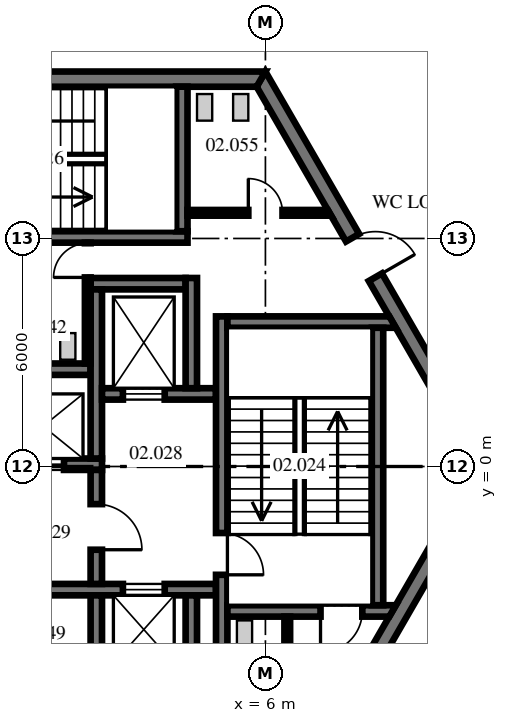
"""IFC4 building model, lengths in metres.
Left out: names, types, materials, properties, quantities, classifications, styles, units other than length and angle.
Written with IfcOpenShell. Run it as: python <this file> out.ifc"""

import sys

from ifc_helpers import new_model, si_unit, direction, frame, frame_2d, origin, place, context, subcontext, project, spatial, polyline, rectangle, outline, extrude, source, transform, mapped, element, fill, save


model = new_model("IFC4")
c1 = context("Model", 3, precision=1e-05, world=origin(), true_north=direction((0.0, 1.0)))
c2 = subcontext(c1, "Body", "Model", "MODEL_VIEW")
j1 = project(units=[si_unit("LENGTHUNIT", "METRE"), si_unit("PLANEANGLEUNIT", "RADIAN")], contexts=[c1])
p1 = place(None, origin())
s1 = spatial("IfcSite", under=j1, at=p1, CompositionType="ELEMENT")
p2 = place(p1, origin())
s2 = spatial("IfcBuilding", under=s1, at=p2, CompositionType="ELEMENT")
p3 = place(p2, frame((0.0, 0.0, 11.5)))
s3 = spatial("IfcBuildingStorey", under=s2, at=p3, CompositionType="ELEMENT", Elevation=11.5)
m1 = source(origin(), c2, "Body", "SweptSolid", [
    extrude(outline(polyline([(-0.115, -0.2), (11.885, -0.2), (11.654, 0.2), (0.115, 0.2), (-0.115, -0.2)])), origin(), (0.0, 0.0, 1.0), 4.3),
])
p4 = place(p3, frame((11.769, 0.0, 0.0), z_axis=(0.0, 0.0, 1.0), x_axis=(-0.499996592174, 0.866027371285, 0.0)))
e1 = element("IfcWall", 1, at=p4, inside=s3, PredefinedType="SHEAR", context=c2, shape_type="MappedRepresentation", body=[
    mapped(m1, transform((0.0, 0.0, 0.0), scale=1.0)),
])
p5 = place(p4, frame((5.75, 0.0, 0.0)))
e2 = element("IfcOpeningElement", 2, at=p5, cuts=e1, PredefinedType="OPENING", context=c2, shape_type="SweptSolid", body=[
    extrude(rectangle(XDim=1.2, YDim=2.1, at=frame_2d((0.6, 1.05))), frame((0.0, 0.21, 0.0), z_axis=(0.0, -1.0, 0.0), x_axis=(1.0, 0.0, 0.0)), (0.0, 0.0, 1.0), 0.42),
])
p6 = place(p3, frame((5.885, 10.192, 0.0), z_axis=(0.0, 0.0, 1.0), x_axis=(-1.0, 0.0, 0.0)))
e3 = element("IfcWall", 3, at=p6, inside=s3, PredefinedType="SHEAR", context=c2, shape_type="MappedRepresentation", body=[
    mapped(m1, transform((0.0, 0.0, 0.0), scale=1.0)),
])
p7 = place(p6, frame((7.985, 0.0, 0.0)))
e4 = element("IfcOpeningElement", 4, at=p7, cuts=e3, PredefinedType="OPENING", context=c2, shape_type="SweptSolid", body=[
    extrude(rectangle(XDim=1.2, YDim=2.1, at=frame_2d((0.6, 1.05))), frame((0.0, 0.21, 0.0), z_axis=(0.0, -1.0, 0.0), x_axis=(1.0, 0.0, 0.0)), (0.0, 0.0, 1.0), 0.42),
])
p8 = place(p3, frame((5.885, -10.192, 0.0), z_axis=(0.0, 0.0, 1.0), x_axis=(0.499996592174, 0.866027371285, 0.0)))
e5 = element("IfcWall", 5, at=p8, inside=s3, PredefinedType="SHEAR", context=c2, shape_type="MappedRepresentation", body=[
    mapped(m1, transform((0.0, 0.0, 0.0), scale=1.0)),
])
p9 = place(p8, frame((3.665, 0.0, 0.0)))
e6 = element("IfcOpeningElement", 6, at=p9, cuts=e5, PredefinedType="OPENING", context=c2, shape_type="SweptSolid", body=[
    extrude(rectangle(XDim=1.2, YDim=2.1, at=frame_2d((0.6, 1.05))), frame((0.0, 0.21, 0.0), z_axis=(0.0, -1.0, 0.0), x_axis=(1.0, 0.0, 0.0)), (0.0, 0.0, 1.0), 0.42),
])
m2 = source(origin(), c2, "Body", "SweptSolid", [
    extrude(rectangle(XDim=11.5, YDim=0.3, at=frame_2d((5.75, 0.0))), origin(), (0.0, 0.0, 1.0), 4.3),
])
p10 = place(p3, frame((-9.8, 0.06, 0.0), z_axis=(0.0, 0.0, 1.0), x_axis=(1.0, 0.0, 0.0)))
e7 = element("IfcWall", 7, at=p10, inside=s3, PredefinedType="SHEAR", context=c2, shape_type="MappedRepresentation", body=[
    mapped(m2, transform((0.0, 0.0, 0.0), scale=1.0)),
])
p11 = place(p10, frame((1.0, 0.0, 0.0)))
e8 = element("IfcOpeningElement", 8, at=p11, cuts=e7, PredefinedType="OPENING", context=c2, shape_type="SweptSolid", body=[
    extrude(rectangle(XDim=1.1, YDim=2.1, at=frame_2d((0.55, 1.05))), frame((0.0, 0.16, 0.0), z_axis=(0.0, -1.0, 0.0), x_axis=(1.0, 0.0, 0.0)), (0.0, 0.0, 1.0), 0.32),
])
p12 = place(p10, frame((3.8, 0.0, 0.0)))
e9 = element("IfcOpeningElement", 9, at=p12, cuts=e7, PredefinedType="OPENING", context=c2, shape_type="SweptSolid", body=[
    extrude(rectangle(XDim=1.1, YDim=2.1, at=frame_2d((0.55, 1.05))), frame((0.0, 0.16, 0.0), z_axis=(0.0, -1.0, 0.0), x_axis=(1.0, 0.0, 0.0)), (0.0, 0.0, 1.0), 0.32),
])
p13 = place(p10, frame((6.6, 0.0, 0.0)))
e10 = element("IfcOpeningElement", 10, at=p13, cuts=e7, PredefinedType="OPENING", context=c2, shape_type="SweptSolid", body=[
    extrude(rectangle(XDim=1.1, YDim=2.1, at=frame_2d((0.55, 1.05))), frame((0.0, 0.16, 0.0), z_axis=(0.0, -1.0, 0.0), x_axis=(1.0, 0.0, 0.0)), (0.0, 0.0, 1.0), 0.32),
])
p14 = place(p10, frame((9.4, 0.0, 0.0)))
e11 = element("IfcOpeningElement", 11, at=p14, cuts=e7, PredefinedType="OPENING", context=c2, shape_type="SweptSolid", body=[
    extrude(rectangle(XDim=1.1, YDim=2.1, at=frame_2d((0.55, 1.05))), frame((0.0, 0.16, 0.0), z_axis=(0.0, -1.0, 0.0), x_axis=(1.0, 0.0, 0.0)), (0.0, 0.0, 1.0), 0.32),
])
m3 = source(origin(), c2, "Body", "SweptSolid", [
    extrude(outline(polyline([(11.2, -0.15), (-0.349, -0.15), (-0.176, 0.15), (11.2, 0.15), (11.2, -0.15)])), origin(), (0.0, 0.0, 1.0), 4.3),
])
p15 = place(p3, frame((-9.8, 2.56, 0.0), z_axis=(0.0, 0.0, 1.0), x_axis=(1.0, 0.0, 0.0)))
e12 = element("IfcWall", 12, at=p15, inside=s3, PredefinedType="SHEAR", context=c2, shape_type="MappedRepresentation", body=[
    mapped(m3, transform((0.0, 0.0, 0.0), scale=1.0)),
])
m4 = source(origin(), c2, "Body", "SweptSolid", [
    extrude(rectangle(XDim=2.5, YDim=0.3, at=frame_2d((1.25, 0.0))), origin(), (0.0, 0.0, 1.0), 4.3),
])
p16 = place(p3, frame((1.4, 4.81, 0.0), z_axis=(0.0, 0.0, 1.0), x_axis=(1.0, 0.0, 0.0)))
e13 = element("IfcWall", 13, at=p16, inside=s3, PredefinedType="SHEAR", context=c2, shape_type="MappedRepresentation", body=[
    mapped(m4, transform((0.0, 0.0, 0.0), scale=1.0)),
])
m5 = source(origin(), c2, "Body", "SweptSolid", [
    extrude(rectangle(XDim=4.45, YDim=0.3, at=frame_2d((2.225, 0.0))), origin(), (0.0, 0.0, 1.0), 4.3),
])
p17 = place(p3, frame((1.55, 0.21, 0.0), z_axis=(0.0, 0.0, 1.0), x_axis=(0.0, 1.0, 0.0)))
e14 = element("IfcWall", 14, at=p17, inside=s3, PredefinedType="SHEAR", context=c2, shape_type="MappedRepresentation", body=[
    mapped(m5, transform((0.0, 0.0, 0.0), scale=1.0)),
])
m6 = source(origin(), c2, "Body", "SweptSolid", [
    extrude(rectangle(XDim=3.0, YDim=0.3, at=frame_2d((1.5, 0.0))), origin(), (0.0, 0.0, 1.0), 4.3),
])
p18 = place(p3, frame((1.7, 1.91, 0.0), z_axis=(0.0, 0.0, 1.0), x_axis=(1.0, 0.0, 0.0)))
e15 = element("IfcWall", 15, at=p18, inside=s3, PredefinedType="SHEAR", context=c2, shape_type="MappedRepresentation", body=[
    mapped(m6, transform((0.0, 0.0, 0.0), scale=1.0)),
])
p19 = place(p18, frame((0.55, 0.0, 0.0)))
e16 = element("IfcOpeningElement", 16, at=p19, cuts=e15, PredefinedType="OPENING", context=c2, shape_type="SweptSolid", body=[
    extrude(rectangle(XDim=1.1, YDim=2.1, at=frame_2d((0.55, 1.05))), frame((0.0, 0.16, 0.0), z_axis=(0.0, -1.0, 0.0), x_axis=(1.0, 0.0, 0.0)), (0.0, 0.0, 1.0), 0.32),
])
m7 = source(origin(), c2, "Body", "SweptSolid", [
    extrude(rectangle(XDim=2.9, YDim=0.3, at=frame_2d((1.45, 0.0))), origin(), (0.0, 0.0, 1.0), 4.3),
])
p20 = place(p3, frame((4.05, 2.06, 0.0), z_axis=(0.0, 0.0, 1.0), x_axis=(0.0, 1.0, 0.0)))
e17 = element("IfcWall", 17, at=p20, inside=s3, PredefinedType="SHEAR", context=c2, shape_type="MappedRepresentation", body=[
    mapped(m7, transform((0.0, 0.0, 0.0), scale=1.0)),
])
m8 = source(origin(), c2, "Body", "SweptSolid", [
    extrude(rectangle(XDim=12.8, YDim=0.3, at=frame_2d((6.4, 0.0))), origin(), (0.0, 0.0, 1.0), 4.3),
])
p21 = place(p3, frame((-8.1, -3.24, 0.0), z_axis=(0.0, 0.0, 1.0), x_axis=(1.0, 0.0, 0.0)))
e18 = element("IfcWall", 18, at=p21, inside=s3, PredefinedType="SHEAR", context=c2, shape_type="MappedRepresentation", body=[
    mapped(m8, transform((0.0, 0.0, 0.0), scale=1.0)),
])
p22 = place(p21, frame((1.613, 0.0, 0.0)))
e19 = element("IfcOpeningElement", 19, at=p22, cuts=e18, PredefinedType="OPENING", context=c2, shape_type="SweptSolid", body=[
    extrude(rectangle(XDim=0.9, YDim=2.1, at=frame_2d((0.45, 1.05))), frame((0.0, 0.16, 0.0), z_axis=(0.0, -1.0, 0.0), x_axis=(1.0, 0.0, 0.0)), (0.0, 0.0, 1.0), 0.32),
])
p23 = place(p21, frame((4.45, 0.0, 0.0)))
e20 = element("IfcOpeningElement", 20, at=p23, cuts=e18, PredefinedType="OPENING", context=c2, shape_type="SweptSolid", body=[
    extrude(rectangle(XDim=0.9, YDim=2.1, at=frame_2d((0.45, 1.05))), frame((0.0, 0.16, 0.0), z_axis=(0.0, -1.0, 0.0), x_axis=(1.0, 0.0, 0.0)), (0.0, 0.0, 1.0), 0.32),
])
p24 = place(p21, frame((7.288, 0.0, 0.0)))
e21 = element("IfcOpeningElement", 21, at=p24, cuts=e18, PredefinedType="OPENING", context=c2, shape_type="SweptSolid", body=[
    extrude(rectangle(XDim=0.9, YDim=2.1, at=frame_2d((0.45, 1.05))), frame((0.0, 0.16, 0.0), z_axis=(0.0, -1.0, 0.0), x_axis=(1.0, 0.0, 0.0)), (0.0, 0.0, 1.0), 0.32),
])
p25 = place(p21, frame((10.35, 0.0, 0.0)))
e22 = element("IfcOpeningElement", 22, at=p25, cuts=e18, PredefinedType="OPENING", context=c2, shape_type="SweptSolid", body=[
    extrude(rectangle(XDim=1.1, YDim=2.1, at=frame_2d((0.55, 1.05))), frame((0.0, 0.16, 0.0), z_axis=(0.0, -1.0, 0.0), x_axis=(1.0, 0.0, 0.0)), (0.0, 0.0, 1.0), 0.32),
])
m9 = source(origin(), c2, "Body", "SweptSolid", [
    extrude(rectangle(XDim=2.2, YDim=0.3, at=frame_2d((1.1, 0.0))), origin(), (0.0, 0.0, 1.0), 4.3),
])
p26 = place(p3, frame((1.55, -5.59, 0.0), z_axis=(0.0, 0.0, 1.0), x_axis=(0.0, 1.0, 0.0)))
e23 = element("IfcWall", 23, at=p26, inside=s3, PredefinedType="SHEAR", context=c2, shape_type="MappedRepresentation", body=[
    mapped(m9, transform((0.0, 0.0, 0.0), scale=1.0)),
])
p27 = place(p3, frame((4.05, -5.89, 0.0), z_axis=(0.0, 0.0, 1.0), x_axis=(0.0, 1.0, 0.0)))
e24 = element("IfcWall", 24, at=p27, inside=s3, PredefinedType="SHEAR", context=c2, shape_type="MappedRepresentation", body=[
    mapped(m4, transform((0.0, 0.0, 0.0), scale=1.0)),
])
p28 = place(p3, frame((1.55, -3.09, 0.0), z_axis=(0.0, 0.0, 1.0), x_axis=(0.0, 1.0, 0.0)))
e25 = element("IfcWall", 25, at=p28, inside=s3, PredefinedType="SHEAR", context=c2, shape_type="MappedRepresentation", body=[
    mapped(m6, transform((0.0, 0.0, 0.0), scale=1.0)),
])
p29 = place(p28, frame((0.9, 0.0, 0.0)))
e26 = element("IfcOpeningElement", 26, at=p29, cuts=e25, PredefinedType="OPENING", context=c2, shape_type="SweptSolid", body=[
    extrude(rectangle(XDim=1.2, YDim=2.1, at=frame_2d((0.6, 1.05))), frame((0.0, 0.16, 0.0), z_axis=(0.0, -1.0, 0.0), x_axis=(1.0, 0.0, 0.0)), (0.0, 0.0, 1.0), 0.32),
])
m10 = source(origin(), c2, "Body", "SweptSolid", [
    extrude(outline(polyline([(-0.15, -0.15), (9.99, -0.15), (9.99, 0.15), (0.15, 0.15), (-0.15, -0.15)])), origin(), (0.0, 0.0, 1.0), 4.3),
])
p30 = place(p3, frame((4.85, -6.04, 0.0), z_axis=(0.0, 0.0, 1.0), x_axis=(0.0, 1.0, 0.0)))
e27 = element("IfcWall", 27, at=p30, inside=s3, PredefinedType="SHEAR", context=c2, shape_type="MappedRepresentation", body=[
    mapped(m10, transform((0.0, 0.0, 0.0), scale=1.0)),
])
p31 = place(p30, frame((3.19, 0.0, 0.0)))
e28 = element("IfcOpeningElement", 28, at=p31, cuts=e27, PredefinedType="OPENING", context=c2, shape_type="SweptSolid", body=[
    extrude(rectangle(XDim=1.1, YDim=2.1, at=frame_2d((0.55, 1.05))), frame((0.0, 0.16, 0.0), z_axis=(0.0, -1.0, 0.0), x_axis=(1.0, 0.0, 0.0)), (0.0, 0.0, 1.0), 0.32),
])
m11 = source(origin(), c2, "Body", "SweptSolid", [
    extrude(outline(polyline([(0.0, -0.15), (0.0, 0.15), (4.26, 0.15), (4.433, -0.15), (0.0, -0.15)])), origin(), (0.0, 0.0, 1.0), 4.3),
])
p32 = place(p3, frame((5.0, 3.8, 0.0), z_axis=(0.0, 0.0, 1.0), x_axis=(1.0, 0.0, 0.0)))
e29 = element("IfcWall", 29, at=p32, inside=s3, PredefinedType="SHEAR", context=c2, shape_type="MappedRepresentation", body=[
    mapped(m11, transform((0.0, 0.0, 0.0), scale=1.0)),
])
m12 = source(origin(), c2, "Body", "SweptSolid", [
    extrude(outline(polyline([(0.0, -0.15), (0.0, 0.15), (4.433, 0.15), (4.26, -0.15), (0.0, -0.15)])), origin(), (0.0, 0.0, 1.0), 4.3),
])
p33 = place(p3, frame((5.0, -3.8, 0.0), z_axis=(0.0, 0.0, 1.0), x_axis=(1.0, 0.0, 0.0)))
e30 = element("IfcWall", 30, at=p33, inside=s3, PredefinedType="SHEAR", context=c2, shape_type="MappedRepresentation", body=[
    mapped(m12, transform((0.0, 0.0, 0.0), scale=1.0)),
])
p34 = place(p33, frame((2.45, 0.0, 0.0)))
e31 = element("IfcOpeningElement", 31, at=p34, cuts=e30, PredefinedType="OPENING", context=c2, shape_type="SweptSolid", body=[
    extrude(rectangle(XDim=1.1, YDim=2.1, at=frame_2d((0.55, 1.05))), frame((0.0, 0.16, 0.0), z_axis=(0.0, -1.0, 0.0), x_axis=(1.0, 0.0, 0.0)), (0.0, 0.0, 1.0), 0.32),
])
m13 = source(origin(), c2, "Body", "SweptSolid", [
    extrude(rectangle(XDim=7.3, YDim=0.3, at=frame_2d((3.65, 0.0))), origin(), (0.0, 0.0, 1.0), 4.3),
])
p35 = place(p3, frame((8.95, -3.65, 0.0), z_axis=(0.0, 0.0, 1.0), x_axis=(0.0, 1.0, 0.0)))
e32 = element("IfcWall", 32, at=p35, inside=s3, PredefinedType="SHEAR", context=c2, shape_type="MappedRepresentation", body=[
    mapped(m13, transform((0.0, 0.0, 0.0), scale=1.0)),
])
m14 = source(origin(), c2, "Body", "SweptSolid", [
    extrude(rectangle(XDim=7.9, YDim=0.3, at=frame_2d((3.95, 0.0))), origin(), (0.0, 0.0, 1.0), 4.3),
])
p36 = place(p3, frame((-3.95, 6.04, 0.0), z_axis=(0.0, 0.0, 1.0), x_axis=(1.0, 0.0, 0.0)))
e33 = element("IfcWall", 33, at=p36, inside=s3, PredefinedType="SHEAR", context=c2, shape_type="MappedRepresentation", body=[
    mapped(m14, transform((0.0, 0.0, 0.0), scale=1.0)),
])
m15 = source(origin(), c2, "Body", "SweptSolid", [
    extrude(outline(polyline([(0.0, -0.15), (0.0, 0.15), (3.804, 0.15), (3.804, -0.15), (0.0, -0.15)])), origin(), (0.0, 0.0, 1.0), 4.3),
])
p37 = place(p3, frame((3.8, 6.19, 0.0), z_axis=(0.0, 0.0, 1.0), x_axis=(0.0, 1.0, 0.0)))
e34 = element("IfcWall", 34, at=p37, inside=s3, PredefinedType="SHEAR", context=c2, shape_type="MappedRepresentation", body=[
    mapped(m15, transform((0.0, 0.0, 0.0), scale=1.0)),
])
m16 = source(origin(), c2, "Body", "SweptSolid", [
    extrude(rectangle(XDim=3.18, YDim=0.15, at=frame_2d((1.59, 0.0))), origin(), (0.0, 0.0, 1.0), 4.3),
])
p38 = place(p3, frame((1.325, 2.71, 0.0), z_axis=(0.0, 0.0, 1.0), x_axis=(0.0, 1.0, 0.0)))
e35 = element("IfcWall", 35, at=p38, inside=s3, PredefinedType="PARTITIONING", context=c2, shape_type="MappedRepresentation", body=[
    mapped(m16, transform((0.0, 0.0, 0.0), scale=1.0)),
])
p39 = place(p38, frame((2.265, 0.0, 0.0)))
e36 = element("IfcOpeningElement", 36, at=p39, cuts=e35, PredefinedType="OPENING", context=c2, shape_type="SweptSolid", body=[
    extrude(rectangle(XDim=0.9, YDim=2.1, at=frame_2d((0.45, 1.05))), frame((0.0, 0.085, 0.0), z_axis=(0.0, -1.0, 0.0), x_axis=(1.0, 0.0, 0.0)), (0.0, 0.0, 1.0), 0.17),
])
m17 = source(origin(), c2, "Body", "SweptSolid", [
    extrude(outline(polyline([(0.0, -0.075), (0.0, 0.075), (3.693, 0.075), (3.78, -0.075), (0.0, -0.075)])), origin(), (0.0, 0.0, 1.0), 4.3),
])
p40 = place(p3, frame((3.95, 6.675, 0.0), z_axis=(0.0, 0.0, 1.0), x_axis=(1.0, 0.0, 0.0)))
e37 = element("IfcWall", 37, at=p40, inside=s3, PredefinedType="PARTITIONING", context=c2, shape_type="MappedRepresentation", body=[
    mapped(m17, transform((0.0, 0.0, 0.0), scale=1.0)),
])
p41 = place(p40, frame((1.6, 0.0, 0.0)))
e38 = element("IfcOpeningElement", 38, at=p41, cuts=e37, PredefinedType="OPENING", context=c2, shape_type="SweptSolid", body=[
    extrude(rectangle(XDim=0.9, YDim=2.1, at=frame_2d((0.45, 1.05))), frame((0.0, 0.085, 0.0), z_axis=(0.0, -1.0, 0.0), x_axis=(1.0, 0.0, 0.0)), (0.0, 0.0, 1.0), 0.17),
])
m18 = source(origin(), c2, "Body", "SweptSolid", [
    extrude(outline(polyline([(-0.075, -0.075), (2.24, -0.075), (2.24, 0.075), (0.075, 0.075), (-0.075, -0.075)])), origin(), (0.0, 0.0, 1.0), 4.3),
])
p42 = place(p3, frame((6.575, -6.19, 0.0), z_axis=(0.0, 0.0, 1.0), x_axis=(0.0, 1.0, 0.0)))
e39 = element("IfcWall", 39, at=p42, inside=s3, PredefinedType="PARTITIONING", context=c2, shape_type="MappedRepresentation", body=[
    mapped(m18, transform((0.0, 0.0, 0.0), scale=1.0)),
])
p43 = place(p3, frame((9.254, 15.956, 0.0), z_axis=(0.0, 0.0, 1.0), x_axis=(0.499997220877, -0.866027008306, 0.0)))
e40 = element("IfcWall", 40, at=p43, inside=s3, PredefinedType="PARTITIONING", context=c2, shape_type="SweptSolid", body=[
    extrude(rectangle(XDim=18.382, YDim=0.2, at=frame_2d((9.191, 0.0))), origin(), (0.0, 0.0, 1.0), 4.3),
])
p44 = place(p43, frame((13.274, 0.0, 0.0)))
e41 = element("IfcOpeningElement", 41, at=p44, cuts=e40, PredefinedType="OPENING", context=c2, shape_type="SweptSolid", body=[
    extrude(rectangle(XDim=0.9, YDim=2.1, at=frame_2d((0.45, 1.05))), frame((0.0, 0.11, 0.0), z_axis=(0.0, -1.0, 0.0), x_axis=(1.0, 0.0, 0.0)), (0.0, 0.0, 1.0), 0.22),
])
p45 = place(p3, frame((9.234, -15.991, 0.0), z_axis=(0.0, 0.0, 1.0), x_axis=(0.499997555488, 0.866026815119, 0.0)))
e42 = element("IfcWall", 42, at=p45, inside=s3, PredefinedType="PARTITIONING", context=c2, shape_type="SweptSolid", body=[
    extrude(rectangle(XDim=18.462, YDim=0.15, at=frame_2d((9.231, 0.0))), origin(), (0.0, 0.0, 1.0), 4.3),
])
p46 = place(p45, frame((3.648, 0.0, 0.0)))
e43 = element("IfcOpeningElement", 43, at=p46, cuts=e42, PredefinedType="OPENING", context=c2, shape_type="SweptSolid", body=[
    extrude(rectangle(XDim=1.8, YDim=2.4, at=frame_2d((0.9, 1.2))), frame((0.0, 0.085, 0.0), z_axis=(0.0, -1.0, 0.0), x_axis=(1.0, 0.0, 0.0)), (0.0, 0.0, 1.0), 0.17),
])
p47 = place(p45, frame((13.281, 0.0, 0.0)))
e44 = element("IfcOpeningElement", 44, at=p47, cuts=e42, PredefinedType="OPENING", context=c2, shape_type="SweptSolid", body=[
    extrude(rectangle(XDim=0.9, YDim=2.1, at=frame_2d((0.45, 1.05))), frame((0.0, 0.085, 0.0), z_axis=(0.0, -1.0, 0.0), x_axis=(1.0, 0.0, 0.0)), (0.0, 0.0, 1.0), 0.17),
])
p48 = place(p5, frame((1.2, 0.0, 0.0), z_axis=(0.0, 0.0, 1.0), x_axis=(-1.0, 0.0, 0.0)))
e45 = element("IfcDoor", 45, at=p48, inside=s3, OperationType="SINGLE_SWING_RIGHT", PredefinedType="DOOR", context=c2, shape_type="SweptSolid", body=[
    extrude(rectangle(XDim=1.2, YDim=2.1, at=frame_2d((0.6, 1.05))), frame((0.0, 0.025, 0.0), z_axis=(0.0, -1.0, 0.0), x_axis=(1.0, 0.0, 0.0)), (0.0, 0.0, 1.0), 0.05),
])
fill(e2, e45)
p49 = place(p31, frame((1.1, 0.0, 0.0), z_axis=(0.0, 0.0, 1.0), x_axis=(-1.0, 0.0, 0.0)))
e46 = element("IfcDoor", 46, at=p49, inside=s3, OperationType="SINGLE_SWING_RIGHT", PredefinedType="DOOR", context=c2, shape_type="SweptSolid", body=[
    extrude(rectangle(XDim=1.1, YDim=2.1, at=frame_2d((0.55, 1.05))), frame((0.0, 0.025, 0.0), z_axis=(0.0, -1.0, 0.0), x_axis=(1.0, 0.0, 0.0)), (0.0, 0.0, 1.0), 0.05),
])
fill(e28, e46)
p50 = place(p34, frame((1.1, 0.0, 0.0), z_axis=(0.0, 0.0, 1.0), x_axis=(-1.0, 0.0, 0.0)))
e47 = element("IfcDoor", 47, at=p50, inside=s3, OperationType="SINGLE_SWING_RIGHT", PredefinedType="DOOR", context=c2, shape_type="SweptSolid", body=[
    extrude(rectangle(XDim=1.1, YDim=2.1, at=frame_2d((0.55, 1.05))), frame((0.0, 0.025, 0.0), z_axis=(0.0, -1.0, 0.0), x_axis=(1.0, 0.0, 0.0)), (0.0, 0.0, 1.0), 0.05),
])
fill(e31, e47)
p51 = place(p29, frame((1.2, 0.0, 0.0), z_axis=(0.0, 0.0, 1.0), x_axis=(-1.0, 0.0, 0.0)))
e48 = element("IfcDoor", 48, at=p51, inside=s3, OperationType="SINGLE_SWING_RIGHT", PredefinedType="DOOR", context=c2, shape_type="SweptSolid", body=[
    extrude(rectangle(XDim=1.2, YDim=2.1, at=frame_2d((0.6, 1.05))), frame((0.0, 0.025, 0.0), z_axis=(0.0, -1.0, 0.0), x_axis=(1.0, 0.0, 0.0)), (0.0, 0.0, 1.0), 0.05),
])
fill(e26, e48)
p52 = place(p39, origin())
e49 = element("IfcDoor", 49, at=p52, inside=s3, OperationType="SINGLE_SWING_LEFT", PredefinedType="DOOR", context=c2, shape_type="SweptSolid", body=[
    extrude(rectangle(XDim=0.9, YDim=2.1, at=frame_2d((0.45, 1.05))), frame((0.0, 0.025, 0.0), z_axis=(0.0, -1.0, 0.0), x_axis=(1.0, 0.0, 0.0)), (0.0, 0.0, 1.0), 0.05),
])
fill(e36, e49)
p53 = place(p41, origin())
e50 = element("IfcDoor", 50, at=p53, inside=s3, OperationType="SINGLE_SWING_LEFT", PredefinedType="DOOR", context=c2, shape_type="SweptSolid", body=[
    extrude(rectangle(XDim=0.9, YDim=2.1, at=frame_2d((0.45, 1.05))), frame((0.0, 0.025, 0.0), z_axis=(0.0, -1.0, 0.0), x_axis=(1.0, 0.0, 0.0)), (0.0, 0.0, 1.0), 0.05),
])
fill(e38, e50)
p54 = place(p14, origin())
e51 = element("IfcDoor", 51, at=p54, inside=s3, OperationType="DOUBLE_DOOR_SLIDING", PredefinedType="DOOR", context=c2, shape_type="SweptSolid", body=[
    extrude(rectangle(XDim=1.1, YDim=2.1, at=frame_2d((0.55, 1.05))), frame((0.0, 0.025, 0.0), z_axis=(0.0, -1.0, 0.0), x_axis=(1.0, 0.0, 0.0)), (0.0, 0.0, 1.0), 0.05),
])
fill(e11, e51)
p55 = place(p19, origin())
e52 = element("IfcDoor", 52, at=p55, inside=s3, OperationType="DOUBLE_DOOR_SLIDING", PredefinedType="DOOR", context=c2, shape_type="SweptSolid", body=[
    extrude(rectangle(XDim=1.1, YDim=2.1, at=frame_2d((0.55, 1.05))), frame((0.0, 0.025, 0.0), z_axis=(0.0, -1.0, 0.0), x_axis=(1.0, 0.0, 0.0)), (0.0, 0.0, 1.0), 0.05),
])
fill(e16, e52)
p56 = place(p25, origin())
e53 = element("IfcDoor", 53, at=p56, inside=s3, OperationType="DOUBLE_DOOR_SLIDING", PredefinedType="DOOR", context=c2, shape_type="SweptSolid", body=[
    extrude(rectangle(XDim=1.1, YDim=2.1, at=frame_2d((0.55, 1.05))), frame((0.0, 0.025, 0.0), z_axis=(0.0, -1.0, 0.0), x_axis=(1.0, 0.0, 0.0)), (0.0, 0.0, 1.0), 0.05),
])
fill(e22, e53)
save(model, sys.argv[1])
